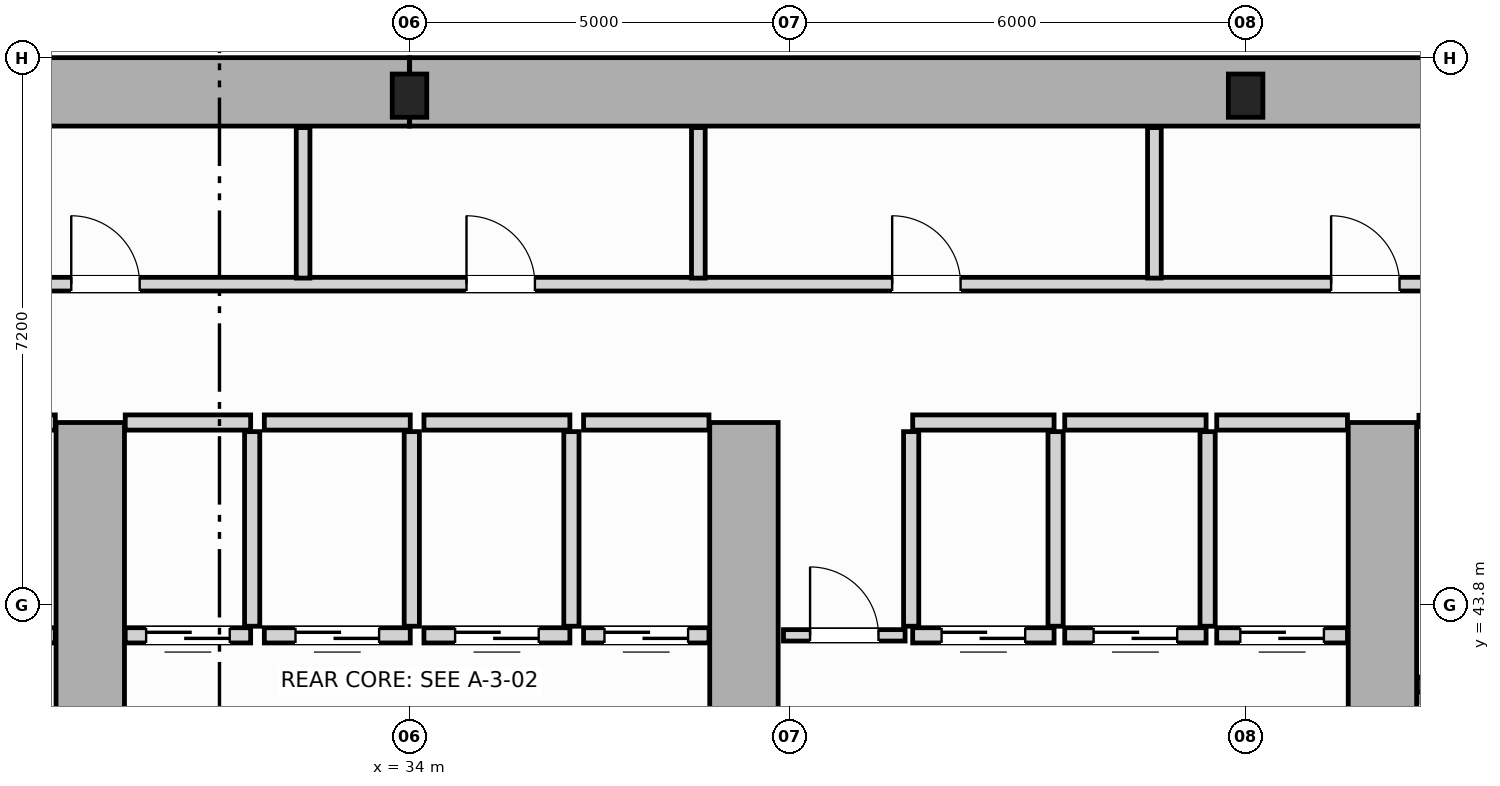
"""IFC4 building model, lengths in metres.
Left out: names, types, materials, properties, quantities, classifications, styles, units other than length and angle.
Written with IfcOpenShell. Run it as: python <this file> out.ifc"""

import sys

from ifc_helpers import new_model, si_unit, direction, frame, frame_2d, origin, origin_2d, place, context, subcontext, project, spatial, rectangle, i_section, extrude, source, transform, mapped, element, fill, save


model = new_model("IFC4")
c1 = context("Model", 3, precision=1e-05, world=origin(), true_north=direction((0.0, 1.0)))
c2 = subcontext(c1, "Body", "Model", "MODEL_VIEW")
j1 = project(units=[si_unit("LENGTHUNIT", "METRE"), si_unit("PLANEANGLEUNIT", "RADIAN")], contexts=[c1])
p1 = place(None, origin())
s1 = spatial("IfcSite", under=j1, at=p1, CompositionType="ELEMENT")
p2 = place(p1, origin())
s2 = spatial("IfcBuilding", under=s1, at=p2, CompositionType="ELEMENT")
p3 = place(p2, origin())
s3 = spatial("IfcBuildingStorey", under=s2, at=p3, CompositionType="ELEMENT", Elevation=0.0)
m1 = source(origin(), c2, "Body", "SweptSolid", [
    extrude(i_section(OverallWidth=0.454, OverallDepth=0.569, WebThickness=0.078, FlangeThickness=0.08, FilletRadius=0.015, at=origin_2d()), origin(), (0.0, 0.0, 1.0), 5.6),
])
for number, where, z_axis, x_axis in (
    (1, (34.0, 50.5, 0.0), (0.0, 0.0, 1.0), (1.0, 0.0, 0.0)),
    (2, (45.0, 50.5, 0.0), (0.0, 0.0, 1.0), (1.0, 0.0, 0.0)),
):
    element("IfcColumn", number, at=place(p3, frame(where, z_axis=z_axis, x_axis=x_axis)), inside=s3, PredefinedType="COLUMN", context=c2, shape_type="MappedRepresentation", body=[
        mapped(m1, transform((0.0, 0.0, 0.0), scale=1.0)),
    ])
for number, where, z_axis, x_axis in (
    (3, (14.454, 50.55, 0.0), (0.0, 0.0, 1.0), (1.0, 0.0, 0.0)),
    (4, (34.002, 50.55, 0.0), (0.0, 0.0, 1.0), (1.0, 0.0, 0.0)),
):
    element("IfcWall", number, at=place(p3, frame(where, z_axis=z_axis, x_axis=x_axis)), inside=s3, PredefinedType="SHEAR", context=c2, shape_type="SweptSolid", body=[
        extrude(rectangle(XDim=19.544, YDim=0.9, at=frame_2d((9.772, 0.0))), origin(), (0.0, 0.0, 1.0), 5.6),
    ])
for number, where, z_axis, x_axis in (
    (5, (29.8, 36.97, 0.0), (0.0, 0.0, 1.0), (0.0, 1.0, 0.0)),
    (6, (38.4, 36.97, 0.0), (0.0, 0.0, 1.0), (0.0, 1.0, 0.0)),
    (7, (46.8, 36.97, 0.0), (0.0, 0.0, 1.0), (0.0, 1.0, 0.0)),
):
    element("IfcWall", number, at=place(p3, frame(where, z_axis=z_axis, x_axis=x_axis)), inside=s3, PredefinedType="SHEAR", context=c2, shape_type="SweptSolid", body=[
        extrude(rectangle(XDim=9.23, YDim=0.9, at=frame_2d((4.615, 0.0))), origin(), (0.0, 0.0, 1.0), 5.6),
    ])
p4 = place(p3, frame((27.69, 43.4, 0.0), z_axis=(0.0, 0.0, 1.0), x_axis=(1.0, 0.0, 0.0)))
e8 = element("IfcWall", 8, at=p4, inside=s3, PredefinedType="SOLIDWALL", context=c2, shape_type="SweptSolid", body=[
    extrude(rectangle(XDim=1.65, YDim=0.2, at=frame_2d((0.825, 0.0))), origin(), (0.0, 0.0, 1.0), 5.32),
])
p5 = place(p4, frame((0.275, 0.0, 0.0)))
e9 = element("IfcOpeningElement", 9, at=p5, cuts=e8, PredefinedType="OPENING", context=c2, shape_type="SweptSolid", body=[
    extrude(rectangle(XDim=1.1, YDim=2.15, at=frame_2d((0.55, 1.075))), frame((0.0, 0.11, 0.0), z_axis=(0.0, -1.0, 0.0), x_axis=(1.0, 0.0, 0.0)), (0.0, 0.0, 1.0), 0.22),
])
p6 = place(p3, frame((27.69, 46.2, 0.0), z_axis=(0.0, 0.0, 1.0), x_axis=(1.0, 0.0, 0.0)))
e10 = element("IfcWall", 10, at=p6, inside=s3, PredefinedType="SOLIDWALL", context=c2, shape_type="SweptSolid", body=[
    extrude(rectangle(XDim=1.65, YDim=0.2, at=frame_2d((0.825, 0.0))), origin(), (0.0, 0.0, 1.0), 5.32),
])
p7 = place(p3, frame((30.26, 43.4, 0.0), z_axis=(0.0, 0.0, 1.0), x_axis=(1.0, 0.0, 0.0)))
e11 = element("IfcWall", 11, at=p7, inside=s3, PredefinedType="SOLIDWALL", context=c2, shape_type="SweptSolid", body=[
    extrude(rectangle(XDim=1.65, YDim=0.2, at=frame_2d((0.825, 0.0))), origin(), (0.0, 0.0, 1.0), 5.32),
])
p8 = place(p7, frame((0.275, 0.0, 0.0)))
e12 = element("IfcOpeningElement", 12, at=p8, cuts=e11, PredefinedType="OPENING", context=c2, shape_type="SweptSolid", body=[
    extrude(rectangle(XDim=1.1, YDim=2.15, at=frame_2d((0.55, 1.075))), frame((0.0, 0.11, 0.0), z_axis=(0.0, -1.0, 0.0), x_axis=(1.0, 0.0, 0.0)), (0.0, 0.0, 1.0), 0.22),
])
p9 = place(p3, frame((30.26, 46.2, 0.0), z_axis=(0.0, 0.0, 1.0), x_axis=(1.0, 0.0, 0.0)))
e13 = element("IfcWall", 13, at=p9, inside=s3, PredefinedType="SOLIDWALL", context=c2, shape_type="SweptSolid", body=[
    extrude(rectangle(XDim=1.65, YDim=0.2, at=frame_2d((0.825, 0.0))), origin(), (0.0, 0.0, 1.0), 5.32),
])
p10 = place(p3, frame((31.93, 43.52, 0.0), z_axis=(0.0, 0.0, 1.0), x_axis=(0.0, 1.0, 0.0)))
e14 = element("IfcWall", 14, at=p10, inside=s3, PredefinedType="SOLIDWALL", context=c2, shape_type="SweptSolid", body=[
    extrude(rectangle(XDim=2.56, YDim=0.2, at=frame_2d((1.28, 0.0))), origin(), (0.0, 0.0, 1.0), 5.32),
])
p11 = place(p3, frame((32.09, 43.4, 0.0), z_axis=(0.0, 0.0, 1.0), x_axis=(1.0, 0.0, 0.0)))
e15 = element("IfcWall", 15, at=p11, inside=s3, PredefinedType="SOLIDWALL", context=c2, shape_type="SweptSolid", body=[
    extrude(rectangle(XDim=1.92, YDim=0.2, at=frame_2d((0.96, 0.0))), origin(), (0.0, 0.0, 1.0), 5.32),
])
p12 = place(p11, frame((0.41, 0.0, 0.0)))
e16 = element("IfcOpeningElement", 16, at=p12, cuts=e15, PredefinedType="OPENING", context=c2, shape_type="SweptSolid", body=[
    extrude(rectangle(XDim=1.1, YDim=2.15, at=frame_2d((0.55, 1.075))), frame((0.0, 0.11, 0.0), z_axis=(0.0, -1.0, 0.0), x_axis=(1.0, 0.0, 0.0)), (0.0, 0.0, 1.0), 0.22),
])
p13 = place(p3, frame((32.09, 46.2, 0.0), z_axis=(0.0, 0.0, 1.0), x_axis=(1.0, 0.0, 0.0)))
e17 = element("IfcWall", 17, at=p13, inside=s3, PredefinedType="SOLIDWALL", context=c2, shape_type="SweptSolid", body=[
    extrude(rectangle(XDim=1.92, YDim=0.2, at=frame_2d((0.96, 0.0))), origin(), (0.0, 0.0, 1.0), 5.32),
])
p14 = place(p3, frame((34.03, 43.52, 0.0), z_axis=(0.0, 0.0, 1.0), x_axis=(0.0, 1.0, 0.0)))
e18 = element("IfcWall", 18, at=p14, inside=s3, PredefinedType="SOLIDWALL", context=c2, shape_type="SweptSolid", body=[
    extrude(rectangle(XDim=2.56, YDim=0.2, at=frame_2d((1.28, 0.0))), origin(), (0.0, 0.0, 1.0), 5.32),
])
p15 = place(p3, frame((34.19, 43.4, 0.0), z_axis=(0.0, 0.0, 1.0), x_axis=(1.0, 0.0, 0.0)))
e19 = element("IfcWall", 19, at=p15, inside=s3, PredefinedType="SOLIDWALL", context=c2, shape_type="SweptSolid", body=[
    extrude(rectangle(XDim=1.92, YDim=0.2, at=frame_2d((0.96, 0.0))), origin(), (0.0, 0.0, 1.0), 5.32),
])
p16 = place(p15, frame((0.41, 0.0, 0.0)))
e20 = element("IfcOpeningElement", 20, at=p16, cuts=e19, PredefinedType="OPENING", context=c2, shape_type="SweptSolid", body=[
    extrude(rectangle(XDim=1.1, YDim=2.15, at=frame_2d((0.55, 1.075))), frame((0.0, 0.11, 0.0), z_axis=(0.0, -1.0, 0.0), x_axis=(1.0, 0.0, 0.0)), (0.0, 0.0, 1.0), 0.22),
])
p17 = place(p3, frame((34.19, 46.2, 0.0), z_axis=(0.0, 0.0, 1.0), x_axis=(1.0, 0.0, 0.0)))
e21 = element("IfcWall", 21, at=p17, inside=s3, PredefinedType="SOLIDWALL", context=c2, shape_type="SweptSolid", body=[
    extrude(rectangle(XDim=1.92, YDim=0.2, at=frame_2d((0.96, 0.0))), origin(), (0.0, 0.0, 1.0), 5.32),
])
p18 = place(p3, frame((36.13, 43.52, 0.0), z_axis=(0.0, 0.0, 1.0), x_axis=(0.0, 1.0, 0.0)))
e22 = element("IfcWall", 22, at=p18, inside=s3, PredefinedType="SOLIDWALL", context=c2, shape_type="SweptSolid", body=[
    extrude(rectangle(XDim=2.56, YDim=0.2, at=frame_2d((1.28, 0.0))), origin(), (0.0, 0.0, 1.0), 5.32),
])
p19 = place(p3, frame((36.29, 43.4, 0.0), z_axis=(0.0, 0.0, 1.0), x_axis=(1.0, 0.0, 0.0)))
e23 = element("IfcWall", 23, at=p19, inside=s3, PredefinedType="SOLIDWALL", context=c2, shape_type="SweptSolid", body=[
    extrude(rectangle(XDim=1.65, YDim=0.2, at=frame_2d((0.825, 0.0))), origin(), (0.0, 0.0, 1.0), 5.32),
])
p20 = place(p19, frame((0.275, 0.0, 0.0)))
e24 = element("IfcOpeningElement", 24, at=p20, cuts=e23, PredefinedType="OPENING", context=c2, shape_type="SweptSolid", body=[
    extrude(rectangle(XDim=1.1, YDim=2.15, at=frame_2d((0.55, 1.075))), frame((0.0, 0.11, 0.0), z_axis=(0.0, -1.0, 0.0), x_axis=(1.0, 0.0, 0.0)), (0.0, 0.0, 1.0), 0.22),
])
p21 = place(p3, frame((36.29, 46.2, 0.0), z_axis=(0.0, 0.0, 1.0), x_axis=(1.0, 0.0, 0.0)))
e25 = element("IfcWall", 25, at=p21, inside=s3, PredefinedType="SOLIDWALL", context=c2, shape_type="SweptSolid", body=[
    extrude(rectangle(XDim=1.65, YDim=0.2, at=frame_2d((0.825, 0.0))), origin(), (0.0, 0.0, 1.0), 5.32),
])
p22 = place(p3, frame((40.62, 43.4, 0.0), z_axis=(0.0, 0.0, 1.0), x_axis=(1.0, 0.0, 0.0)))
e26 = element("IfcWall", 26, at=p22, inside=s3, PredefinedType="SOLIDWALL", context=c2, shape_type="SweptSolid", body=[
    extrude(rectangle(XDim=1.86, YDim=0.2, at=frame_2d((0.93, 0.0))), origin(), (0.0, 0.0, 1.0), 5.32),
])
p23 = place(p22, frame((0.38, 0.0, 0.0)))
e27 = element("IfcOpeningElement", 27, at=p23, cuts=e26, PredefinedType="OPENING", context=c2, shape_type="SweptSolid", body=[
    extrude(rectangle(XDim=1.1, YDim=2.15, at=frame_2d((0.55, 1.075))), frame((0.0, 0.11, 0.0), z_axis=(0.0, -1.0, 0.0), x_axis=(1.0, 0.0, 0.0)), (0.0, 0.0, 1.0), 0.22),
])
p24 = place(p3, frame((40.62, 46.2, 0.0), z_axis=(0.0, 0.0, 1.0), x_axis=(1.0, 0.0, 0.0)))
e28 = element("IfcWall", 28, at=p24, inside=s3, PredefinedType="SOLIDWALL", context=c2, shape_type="SweptSolid", body=[
    extrude(rectangle(XDim=1.86, YDim=0.2, at=frame_2d((0.93, 0.0))), origin(), (0.0, 0.0, 1.0), 5.32),
])
for number, where, z_axis, x_axis in (
    (29, (40.6, 43.52, 0.0), (0.0, 0.0, 1.0), (0.0, 1.0, 0.0)),
    (30, (42.5, 43.52, 0.0), (0.0, 0.0, 1.0), (0.0, 1.0, 0.0)),
):
    element("IfcWall", number, at=place(p3, frame(where, z_axis=z_axis, x_axis=x_axis)), inside=s3, PredefinedType="SOLIDWALL", context=c2, shape_type="SweptSolid", body=[
        extrude(rectangle(XDim=2.56, YDim=0.2, at=frame_2d((1.28, 0.0))), origin(), (0.0, 0.0, 1.0), 5.32),
    ])
p25 = place(p3, frame((42.62, 43.4, 0.0), z_axis=(0.0, 0.0, 1.0), x_axis=(1.0, 0.0, 0.0)))
e31 = element("IfcWall", 31, at=p25, inside=s3, PredefinedType="SOLIDWALL", context=c2, shape_type="SweptSolid", body=[
    extrude(rectangle(XDim=1.86, YDim=0.2, at=frame_2d((0.93, 0.0))), origin(), (0.0, 0.0, 1.0), 5.32),
])
p26 = place(p25, frame((0.38, 0.0, 0.0)))
e32 = element("IfcOpeningElement", 32, at=p26, cuts=e31, PredefinedType="OPENING", context=c2, shape_type="SweptSolid", body=[
    extrude(rectangle(XDim=1.1, YDim=2.15, at=frame_2d((0.55, 1.075))), frame((0.0, 0.11, 0.0), z_axis=(0.0, -1.0, 0.0), x_axis=(1.0, 0.0, 0.0)), (0.0, 0.0, 1.0), 0.22),
])
p27 = place(p3, frame((42.62, 46.2, 0.0), z_axis=(0.0, 0.0, 1.0), x_axis=(1.0, 0.0, 0.0)))
e33 = element("IfcWall", 33, at=p27, inside=s3, PredefinedType="SOLIDWALL", context=c2, shape_type="SweptSolid", body=[
    extrude(rectangle(XDim=1.86, YDim=0.2, at=frame_2d((0.93, 0.0))), origin(), (0.0, 0.0, 1.0), 5.32),
])
p28 = place(p3, frame((44.5, 43.52, 0.0), z_axis=(0.0, 0.0, 1.0), x_axis=(0.0, 1.0, 0.0)))
e34 = element("IfcWall", 34, at=p28, inside=s3, PredefinedType="SOLIDWALL", context=c2, shape_type="SweptSolid", body=[
    extrude(rectangle(XDim=2.56, YDim=0.2, at=frame_2d((1.28, 0.0))), origin(), (0.0, 0.0, 1.0), 5.32),
])
p29 = place(p3, frame((44.62, 43.4, 0.0), z_axis=(0.0, 0.0, 1.0), x_axis=(1.0, 0.0, 0.0)))
e35 = element("IfcWall", 35, at=p29, inside=s3, PredefinedType="SOLIDWALL", context=c2, shape_type="SweptSolid", body=[
    extrude(rectangle(XDim=1.72, YDim=0.2, at=frame_2d((0.86, 0.0))), origin(), (0.0, 0.0, 1.0), 5.32),
])
p30 = place(p29, frame((0.31, 0.0, 0.0)))
e36 = element("IfcOpeningElement", 36, at=p30, cuts=e35, PredefinedType="OPENING", context=c2, shape_type="SweptSolid", body=[
    extrude(rectangle(XDim=1.1, YDim=2.15, at=frame_2d((0.55, 1.075))), frame((0.0, 0.11, 0.0), z_axis=(0.0, -1.0, 0.0), x_axis=(1.0, 0.0, 0.0)), (0.0, 0.0, 1.0), 0.22),
])
p31 = place(p3, frame((44.62, 46.2, 0.0), z_axis=(0.0, 0.0, 1.0), x_axis=(1.0, 0.0, 0.0)))
e37 = element("IfcWall", 37, at=p31, inside=s3, PredefinedType="SOLIDWALL", context=c2, shape_type="SweptSolid", body=[
    extrude(rectangle(XDim=1.72, YDim=0.2, at=frame_2d((0.86, 0.0))), origin(), (0.0, 0.0, 1.0), 5.32),
])
p32 = place(p3, frame((47.26, 42.75, 0.0), z_axis=(0.0, 0.0, 1.0), x_axis=(1.0, 0.0, 0.0)))
e38 = element("IfcWall", 38, at=p32, inside=s3, PredefinedType="SOLIDWALL", context=c2, shape_type="SweptSolid", body=[
    extrude(rectangle(XDim=2.07, YDim=0.2, at=frame_2d((1.035, 0.0))), origin(), (0.0, 0.0, 1.0), 5.32),
])
p33 = place(p3, frame((47.28, 46.22, 0.0), z_axis=(0.0, 0.0, 1.0), x_axis=(1.0, 0.0, 0.0)))
e39 = element("IfcWall", 39, at=p33, inside=s3, PredefinedType="PARTITIONING", context=c2, shape_type="SweptSolid", body=[
    extrude(rectangle(XDim=2.1, YDim=0.15, at=frame_2d((1.05, 0.0))), origin(), (0.0, 0.0, 1.0), 5.32),
])
p34 = place(p33, frame((0.55, 0.0, 0.0)))
e40 = element("IfcOpeningElement", 40, at=p34, cuts=e39, PredefinedType="OPENING", context=c2, shape_type="SweptSolid", body=[
    extrude(rectangle(XDim=0.9, YDim=2.1, at=frame_2d((0.45, 1.05))), frame((0.0, 0.085, 0.0), z_axis=(0.0, -1.0, 0.0), x_axis=(1.0, 0.0, 0.0)), (0.0, 0.0, 1.0), 0.17),
])
p35 = place(p3, frame((38.92, 43.4, 0.0), z_axis=(0.0, 0.0, 1.0), x_axis=(1.0, 0.0, 0.0)))
e41 = element("IfcWall", 41, at=p35, inside=s3, PredefinedType="PARTITIONING", context=c2, shape_type="SweptSolid", body=[
    extrude(rectangle(XDim=1.6, YDim=0.15, at=frame_2d((0.8, 0.0))), origin(), (0.0, 0.0, 1.0), 5.32),
])
p36 = place(p35, frame((0.35, 0.0, 0.0)))
e42 = element("IfcOpeningElement", 42, at=p36, cuts=e41, PredefinedType="OPENING", context=c2, shape_type="SweptSolid", body=[
    extrude(rectangle(XDim=0.9, YDim=2.1, at=frame_2d((0.45, 1.05))), frame((0.0, 0.085, 0.0), z_axis=(0.0, -1.0, 0.0), x_axis=(1.0, 0.0, 0.0)), (0.0, 0.0, 1.0), 0.17),
])
p37 = place(p3, frame((18.62, 48.02, 0.0), z_axis=(0.0, 0.0, 1.0), x_axis=(1.0, 0.0, 0.0)))
e43 = element("IfcWall", 43, at=p37, inside=s3, PredefinedType="PLUMBINGWALL", context=c2, shape_type="SweptSolid", body=[
    extrude(rectangle(XDim=30.76, YDim=0.18, at=frame_2d((15.38, 0.0))), origin(), (0.0, 0.0, 1.0), 5.32),
])
p38 = place(p37, frame((1.655, 0.0, 0.0)))
e44 = element("IfcOpeningElement", 44, at=p38, cuts=e43, PredefinedType="OPENING", context=c2, shape_type="SweptSolid", body=[
    extrude(rectangle(XDim=0.9, YDim=2.15, at=frame_2d((0.45, 1.075))), frame((0.0, 0.1, 0.0), z_axis=(0.0, -1.0, 0.0), x_axis=(1.0, 0.0, 0.0)), (0.0, 0.0, 1.0), 0.2),
])
p39 = place(p37, frame((6.03, 0.0, 0.0)))
e45 = element("IfcOpeningElement", 45, at=p39, cuts=e43, PredefinedType="OPENING", context=c2, shape_type="SweptSolid", body=[
    extrude(rectangle(XDim=0.9, YDim=2.15, at=frame_2d((0.45, 1.075))), frame((0.0, 0.1, 0.0), z_axis=(0.0, -1.0, 0.0), x_axis=(1.0, 0.0, 0.0)), (0.0, 0.0, 1.0), 0.2),
])
p40 = place(p37, frame((10.93, 0.0, 0.0)))
e46 = element("IfcOpeningElement", 46, at=p40, cuts=e43, PredefinedType="OPENING", context=c2, shape_type="SweptSolid", body=[
    extrude(rectangle(XDim=0.9, YDim=2.15, at=frame_2d((0.45, 1.075))), frame((0.0, 0.1, 0.0), z_axis=(0.0, -1.0, 0.0), x_axis=(1.0, 0.0, 0.0)), (0.0, 0.0, 1.0), 0.2),
])
p41 = place(p37, frame((16.13, 0.0, 0.0)))
e47 = element("IfcOpeningElement", 47, at=p41, cuts=e43, PredefinedType="OPENING", context=c2, shape_type="SweptSolid", body=[
    extrude(rectangle(XDim=0.9, YDim=2.15, at=frame_2d((0.45, 1.075))), frame((0.0, 0.1, 0.0), z_axis=(0.0, -1.0, 0.0), x_axis=(1.0, 0.0, 0.0)), (0.0, 0.0, 1.0), 0.2),
])
p42 = place(p37, frame((21.73, 0.0, 0.0)))
e48 = element("IfcOpeningElement", 48, at=p42, cuts=e43, PredefinedType="OPENING", context=c2, shape_type="SweptSolid", body=[
    extrude(rectangle(XDim=0.9, YDim=2.15, at=frame_2d((0.45, 1.075))), frame((0.0, 0.1, 0.0), z_axis=(0.0, -1.0, 0.0), x_axis=(1.0, 0.0, 0.0)), (0.0, 0.0, 1.0), 0.2),
])
p43 = place(p37, frame((27.505, 0.0, 0.0)))
e49 = element("IfcOpeningElement", 49, at=p43, cuts=e43, PredefinedType="OPENING", context=c2, shape_type="SweptSolid", body=[
    extrude(rectangle(XDim=0.9, YDim=2.15, at=frame_2d((0.45, 1.075))), frame((0.0, 0.1, 0.0), z_axis=(0.0, -1.0, 0.0), x_axis=(1.0, 0.0, 0.0)), (0.0, 0.0, 1.0), 0.2),
])
for number, where, z_axis, x_axis in (
    (50, (32.6, 48.1, 0.0), (0.0, 0.0, 1.0), (0.0, 1.0, 0.0)),
    (51, (37.8, 48.1, 0.0), (0.0, 0.0, 1.0), (0.0, 1.0, 0.0)),
    (52, (43.8, 48.1, 0.0), (0.0, 0.0, 1.0), (0.0, 1.0, 0.0)),
):
    element("IfcWall", number, at=place(p3, frame(where, z_axis=z_axis, x_axis=x_axis)), inside=s3, PredefinedType="PLUMBINGWALL", context=c2, shape_type="SweptSolid", body=[
        extrude(rectangle(XDim=1.98, YDim=0.18, at=frame_2d((0.99, 0.0))), origin(), (0.0, 0.0, 1.0), 5.32),
    ])
m2 = source(origin(), c2, "Body", "SweptSolid", [
    extrude(rectangle(XDim=1.1, YDim=2.15, at=frame_2d((0.55, 1.075))), frame((0.0, 0.025, 0.0), z_axis=(0.0, -1.0, 0.0), x_axis=(1.0, 0.0, 0.0)), (0.0, 0.0, 1.0), 0.05),
])
p44 = place(p8, origin())
e53 = element("IfcDoor", 53, at=p44, inside=s3, OperationType="DOUBLE_DOOR_SLIDING", PredefinedType="DOOR", context=c2, shape_type="MappedRepresentation", body=[
    mapped(m2, transform((0.0, 0.0, 0.0), scale=1.0)),
])
fill(e12, e53)
p45 = place(p12, origin())
e54 = element("IfcDoor", 54, at=p45, inside=s3, OperationType="DOUBLE_DOOR_SLIDING", PredefinedType="DOOR", context=c2, shape_type="MappedRepresentation", body=[
    mapped(m2, transform((0.0, 0.0, 0.0), scale=1.0)),
])
fill(e16, e54)
p46 = place(p16, origin())
e55 = element("IfcDoor", 55, at=p46, inside=s3, OperationType="DOUBLE_DOOR_SLIDING", PredefinedType="DOOR", context=c2, shape_type="MappedRepresentation", body=[
    mapped(m2, transform((0.0, 0.0, 0.0), scale=1.0)),
])
fill(e20, e55)
p47 = place(p20, origin())
e56 = element("IfcDoor", 56, at=p47, inside=s3, OperationType="DOUBLE_DOOR_SLIDING", PredefinedType="DOOR", context=c2, shape_type="MappedRepresentation", body=[
    mapped(m2, transform((0.0, 0.0, 0.0), scale=1.0)),
])
fill(e24, e56)
p48 = place(p23, origin())
e57 = element("IfcDoor", 57, at=p48, inside=s3, OperationType="DOUBLE_DOOR_SLIDING", PredefinedType="DOOR", context=c2, shape_type="MappedRepresentation", body=[
    mapped(m2, transform((0.0, 0.0, 0.0), scale=1.0)),
])
fill(e27, e57)
p49 = place(p26, origin())
e58 = element("IfcDoor", 58, at=p49, inside=s3, OperationType="DOUBLE_DOOR_SLIDING", PredefinedType="DOOR", context=c2, shape_type="MappedRepresentation", body=[
    mapped(m2, transform((0.0, 0.0, 0.0), scale=1.0)),
])
fill(e32, e58)
p50 = place(p30, origin())
e59 = element("IfcDoor", 59, at=p50, inside=s3, OperationType="DOUBLE_DOOR_SLIDING", PredefinedType="DOOR", context=c2, shape_type="MappedRepresentation", body=[
    mapped(m2, transform((0.0, 0.0, 0.0), scale=1.0)),
])
fill(e36, e59)
m3 = source(origin(), c2, "Body", "SweptSolid", [
    extrude(rectangle(XDim=0.9, YDim=2.1, at=frame_2d((0.45, 1.05))), frame((0.0, 0.025, 0.0), z_axis=(0.0, -1.0, 0.0), x_axis=(1.0, 0.0, 0.0)), (0.0, 0.0, 1.0), 0.05),
])
p51 = place(p36, origin())
e60 = element("IfcDoor", 60, at=p51, inside=s3, OperationType="SINGLE_SWING_LEFT", PredefinedType="DOOR", context=c2, shape_type="MappedRepresentation", body=[
    mapped(m3, transform((0.0, 0.0, 0.0), scale=1.0)),
])
fill(e42, e60)
m4 = source(origin(), c2, "Body", "SweptSolid", [
    extrude(rectangle(XDim=0.9, YDim=2.15, at=frame_2d((0.45, 1.075))), frame((0.0, 0.025, 0.0), z_axis=(0.0, -1.0, 0.0), x_axis=(1.0, 0.0, 0.0)), (0.0, 0.0, 1.0), 0.05),
])
p52 = place(p40, origin())
e61 = element("IfcDoor", 61, at=p52, inside=s3, OperationType="SINGLE_SWING_LEFT", PredefinedType="DOOR", context=c2, shape_type="MappedRepresentation", body=[
    mapped(m4, transform((0.0, 0.0, 0.0), scale=1.0)),
])
fill(e46, e61)
p53 = place(p41, origin())
e62 = element("IfcDoor", 62, at=p53, inside=s3, OperationType="SINGLE_SWING_RIGHT", PredefinedType="DOOR", context=c2, shape_type="MappedRepresentation", body=[
    mapped(m4, transform((0.0, 0.0, 0.0), scale=1.0)),
])
fill(e47, e62)
p54 = place(p42, origin())
e63 = element("IfcDoor", 63, at=p54, inside=s3, OperationType="SINGLE_SWING_LEFT", PredefinedType="DOOR", context=c2, shape_type="MappedRepresentation", body=[
    mapped(m4, transform((0.0, 0.0, 0.0), scale=1.0)),
])
fill(e48, e63)
p55 = place(p43, origin())
e64 = element("IfcDoor", 64, at=p55, inside=s3, OperationType="SINGLE_SWING_RIGHT", PredefinedType="DOOR", context=c2, shape_type="MappedRepresentation", body=[
    mapped(m4, transform((0.0, 0.0, 0.0), scale=1.0)),
])
fill(e49, e64)
save(model, sys.argv[1])
